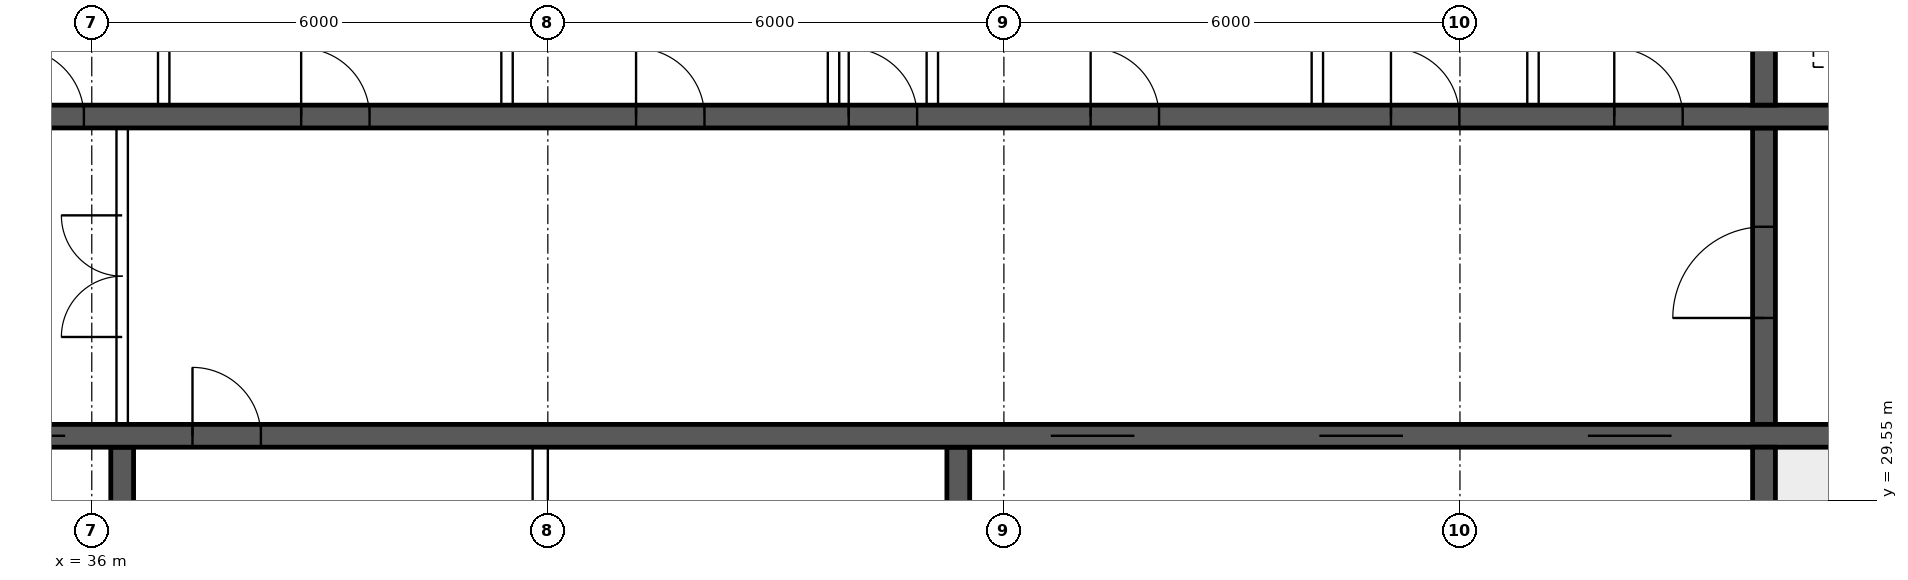
"""IFC4 building model, lengths in metres.
Left out: names, types, materials, properties, quantities, classifications, styles, units other than length and angle.
Written with IfcOpenShell. Run it as: python <this file> out.ifc"""

import sys

from ifc_helpers import new_model, si_unit, direction, frame, frame_2d, origin, place, context, subcontext, project, spatial, rectangle, extrude, element, fill, save


model = new_model("IFC4")
c1 = context("Model", 3, precision=1e-05, world=origin(), true_north=direction((0.0, 1.0)))
c2 = subcontext(c1, "Body", "Model", "MODEL_VIEW")
j1 = project(units=[si_unit("LENGTHUNIT", "METRE"), si_unit("PLANEANGLEUNIT", "RADIAN")], contexts=[c1])
p1 = place(None, origin())
s1 = spatial("IfcSite", under=j1, at=p1, CompositionType="ELEMENT")
p2 = place(p1, origin())
s2 = spatial("IfcBuilding", under=s1, at=p2, CompositionType="ELEMENT")
p3 = place(p2, frame((0.0, 0.0, 189.85)))
s3 = spatial("IfcBuildingStorey", under=s2, at=p3, CompositionType="ELEMENT", Elevation=189.85)
p4 = place(p3, frame((18.425, 30.4, 0.0), z_axis=(0.0, 0.0, 1.0), x_axis=(1.0, 0.0, 0.0)))
e1 = element("IfcWall", 1, at=p4, inside=s3, PredefinedType="SHEAR", context=c2, shape_type="SweptSolid", body=[
    extrude(rectangle(XDim=47.15, YDim=0.3, at=frame_2d((23.575, 0.0))), origin(), (0.0, 0.0, 1.0), 3.75),
])
p5 = place(p4, frame((0.4, 0.0, 0.0)))
e2 = element("IfcOpeningElement", 2, at=p5, cuts=e1, PredefinedType="OPENING", context=c2, shape_type="SweptSolid", body=[
    extrude(rectangle(XDim=1.0, YDim=2.1, at=frame_2d((0.5, 1.05))), frame((0.0, 0.16, 0.0), z_axis=(0.0, -1.0, 0.0), x_axis=(1.0, 0.0, 0.0)), (0.0, 0.0, 1.0), 0.32),
])
p6 = place(p4, frame((45.75, 0.0, 0.0)))
e3 = element("IfcOpeningElement", 3, at=p6, cuts=e1, PredefinedType="OPENING", context=c2, shape_type="SweptSolid", body=[
    extrude(rectangle(XDim=1.0, YDim=2.1, at=frame_2d((0.5, 1.05))), frame((0.0, 0.16, 0.0), z_axis=(0.0, -1.0, 0.0), x_axis=(1.0, 0.0, 0.0)), (0.0, 0.0, 1.0), 0.32),
])
p7 = place(p4, frame((8.325, 0.0, 0.0)))
e4 = element("IfcOpeningElement", 4, at=p7, cuts=e1, PredefinedType="OPENING", context=c2, shape_type="SweptSolid", body=[
    extrude(rectangle(XDim=1.1, YDim=2.1, at=frame_2d((0.55, 1.05))), frame((0.0, 0.16, 0.0), z_axis=(0.0, -1.0, 0.0), x_axis=(1.0, 0.0, 0.0)), (0.0, 0.0, 1.0), 0.32),
])
p8 = place(p4, frame((10.925, 0.0, 0.0)))
e5 = element("IfcOpeningElement", 5, at=p8, cuts=e1, PredefinedType="OPENING", context=c2, shape_type="SweptSolid", body=[
    extrude(rectangle(XDim=1.1, YDim=2.1, at=frame_2d((0.55, 1.05))), frame((0.0, 0.16, 0.0), z_axis=(0.0, -1.0, 0.0), x_axis=(1.0, 0.0, 0.0)), (0.0, 0.0, 1.0), 0.32),
])
p9 = place(p4, frame((13.525, 0.0, 0.0)))
e6 = element("IfcOpeningElement", 6, at=p9, cuts=e1, PredefinedType="OPENING", context=c2, shape_type="SweptSolid", body=[
    extrude(rectangle(XDim=1.1, YDim=2.1, at=frame_2d((0.55, 1.05))), frame((0.0, 0.16, 0.0), z_axis=(0.0, -1.0, 0.0), x_axis=(1.0, 0.0, 0.0)), (0.0, 0.0, 1.0), 0.32),
])
p10 = place(p4, frame((16.125, 0.0, 0.0)))
e7 = element("IfcOpeningElement", 7, at=p10, cuts=e1, PredefinedType="OPENING", context=c2, shape_type="SweptSolid", body=[
    extrude(rectangle(XDim=1.1, YDim=2.1, at=frame_2d((0.55, 1.05))), frame((0.0, 0.16, 0.0), z_axis=(0.0, -1.0, 0.0), x_axis=(1.0, 0.0, 0.0)), (0.0, 0.0, 1.0), 0.32),
])
p11 = place(p4, frame((18.9, 0.0, 0.0)))
e8 = element("IfcOpeningElement", 8, at=p11, cuts=e1, PredefinedType="OPENING", context=c2, shape_type="SweptSolid", body=[
    extrude(rectangle(XDim=0.9, YDim=2.1, at=frame_2d((0.45, 1.05))), frame((0.0, 0.16, 0.0), z_axis=(0.0, -1.0, 0.0), x_axis=(1.0, 0.0, 0.0)), (0.0, 0.0, 1.0), 0.32),
])
p12 = place(p4, frame((30.192, 0.0, 0.0)))
e9 = element("IfcOpeningElement", 9, at=p12, cuts=e1, PredefinedType="OPENING", context=c2, shape_type="SweptSolid", body=[
    extrude(rectangle(XDim=1.1, YDim=2.1, at=frame_2d((0.55, 1.05))), frame((0.0, 0.16, 0.0), z_axis=(0.0, -1.0, 0.0), x_axis=(1.0, 0.0, 0.0)), (0.0, 0.0, 1.0), 0.32),
])
p13 = place(p4, frame((33.725, 0.0, 0.0)))
e10 = element("IfcOpeningElement", 10, at=p13, cuts=e1, PredefinedType="OPENING", context=c2, shape_type="SweptSolid", body=[
    extrude(rectangle(XDim=1.1, YDim=2.1, at=frame_2d((0.55, 1.05))), frame((0.0, 0.16, 0.0), z_axis=(0.0, -1.0, 0.0), x_axis=(1.0, 0.0, 0.0)), (0.0, 0.0, 1.0), 0.32),
])
p14 = place(p4, frame((37.258, 0.0, 0.0)))
e11 = element("IfcOpeningElement", 11, at=p14, cuts=e1, PredefinedType="OPENING", context=c2, shape_type="SweptSolid", body=[
    extrude(rectangle(XDim=1.1, YDim=2.1, at=frame_2d((0.55, 1.05))), frame((0.0, 0.16, 0.0), z_axis=(0.0, -1.0, 0.0), x_axis=(1.0, 0.0, 0.0)), (0.0, 0.0, 1.0), 0.32),
])
p15 = place(p3, frame((18.425, 34.6, 0.0), z_axis=(0.0, 0.0, 1.0), x_axis=(1.0, 0.0, 0.0)))
e12 = element("IfcWall", 12, at=p15, inside=s3, PredefinedType="SHEAR", context=c2, shape_type="SweptSolid", body=[
    extrude(rectangle(XDim=47.15, YDim=0.3, at=frame_2d((23.575, 0.0))), origin(), (0.0, 0.0, 1.0), 3.75),
])
p16 = place(p15, frame((0.9, 0.0, 0.0)))
e13 = element("IfcOpeningElement", 13, at=p16, cuts=e12, PredefinedType="OPENING", context=c2, shape_type="SweptSolid", body=[
    extrude(rectangle(XDim=1.1, YDim=2.1, at=frame_2d((0.55, 1.05))), frame((0.0, 0.16, 0.0), z_axis=(0.0, -1.0, 0.0), x_axis=(1.0, 0.0, 0.0)), (0.0, 0.0, 1.0), 0.32),
])
p17 = place(p15, frame((45.15, 0.0, 0.0)))
e14 = element("IfcOpeningElement", 14, at=p17, cuts=e12, PredefinedType="OPENING", context=c2, shape_type="SweptSolid", body=[
    extrude(rectangle(XDim=1.1, YDim=2.1, at=frame_2d((0.55, 1.05))), frame((0.0, 0.16, 0.0), z_axis=(0.0, -1.0, 0.0), x_axis=(1.0, 0.0, 0.0)), (0.0, 0.0, 1.0), 0.32),
])
p18 = place(p15, frame((4.175, 0.0, 0.0)))
e15 = element("IfcOpeningElement", 15, at=p18, cuts=e12, PredefinedType="OPENING", context=c2, shape_type="SweptSolid", body=[
    extrude(rectangle(XDim=0.9, YDim=2.1, at=frame_2d((0.45, 1.05))), frame((0.0, 0.16, 0.0), z_axis=(0.0, -1.0, 0.0), x_axis=(1.0, 0.0, 0.0)), (0.0, 0.0, 1.0), 0.32),
])
p19 = place(p15, frame((42.075, 0.0, 0.0)))
e16 = element("IfcOpeningElement", 16, at=p19, cuts=e12, PredefinedType="OPENING", context=c2, shape_type="SweptSolid", body=[
    extrude(rectangle(XDim=0.9, YDim=2.1, at=frame_2d((0.45, 1.05))), frame((0.0, 0.16, 0.0), z_axis=(0.0, -1.0, 0.0), x_axis=(1.0, 0.0, 0.0)), (0.0, 0.0, 1.0), 0.32),
])
p20 = place(p15, frame((8.95, 0.0, 0.0)))
e17 = element("IfcOpeningElement", 17, at=p20, cuts=e12, PredefinedType="OPENING", context=c2, shape_type="SweptSolid", body=[
    extrude(rectangle(XDim=0.9, YDim=2.1, at=frame_2d((0.45, 1.05))), frame((0.0, 0.16, 0.0), z_axis=(0.0, -1.0, 0.0), x_axis=(1.0, 0.0, 0.0)), (0.0, 0.0, 1.0), 0.32),
])
p21 = place(p15, frame((12.924, 0.0, 0.0)))
e18 = element("IfcOpeningElement", 18, at=p21, cuts=e12, PredefinedType="OPENING", context=c2, shape_type="SweptSolid", body=[
    extrude(rectangle(XDim=0.9, YDim=2.1, at=frame_2d((0.45, 1.05))), frame((0.0, 0.16, 0.0), z_axis=(0.0, -1.0, 0.0), x_axis=(1.0, 0.0, 0.0)), (0.0, 0.0, 1.0), 0.32),
])
p22 = place(p15, frame((16.571, 0.0, 0.0)))
e19 = element("IfcOpeningElement", 19, at=p22, cuts=e12, PredefinedType="OPENING", context=c2, shape_type="SweptSolid", body=[
    extrude(rectangle(XDim=0.9, YDim=2.1, at=frame_2d((0.45, 1.05))), frame((0.0, 0.16, 0.0), z_axis=(0.0, -1.0, 0.0), x_axis=(1.0, 0.0, 0.0)), (0.0, 0.0, 1.0), 0.32),
])
p23 = place(p15, frame((20.33, 0.0, 0.0)))
e20 = element("IfcOpeningElement", 20, at=p23, cuts=e12, PredefinedType="OPENING", context=c2, shape_type="SweptSolid", body=[
    extrude(rectangle(XDim=0.9, YDim=2.1, at=frame_2d((0.45, 1.05))), frame((0.0, 0.16, 0.0), z_axis=(0.0, -1.0, 0.0), x_axis=(1.0, 0.0, 0.0)), (0.0, 0.0, 1.0), 0.32),
])
p24 = place(p15, frame((24.736, 0.0, 0.0)))
e21 = element("IfcOpeningElement", 21, at=p24, cuts=e12, PredefinedType="OPENING", context=c2, shape_type="SweptSolid", body=[
    extrude(rectangle(XDim=0.9, YDim=2.1, at=frame_2d((0.45, 1.05))), frame((0.0, 0.16, 0.0), z_axis=(0.0, -1.0, 0.0), x_axis=(1.0, 0.0, 0.0)), (0.0, 0.0, 1.0), 0.32),
])
p25 = place(p15, frame((27.533, 0.0, 0.0)))
e22 = element("IfcOpeningElement", 22, at=p25, cuts=e12, PredefinedType="OPENING", context=c2, shape_type="SweptSolid", body=[
    extrude(rectangle(XDim=0.9, YDim=2.1, at=frame_2d((0.45, 1.05))), frame((0.0, 0.16, 0.0), z_axis=(0.0, -1.0, 0.0), x_axis=(1.0, 0.0, 0.0)), (0.0, 0.0, 1.0), 0.32),
])
p26 = place(p15, frame((30.716, 0.0, 0.0)))
e23 = element("IfcOpeningElement", 23, at=p26, cuts=e12, PredefinedType="OPENING", context=c2, shape_type="SweptSolid", body=[
    extrude(rectangle(XDim=0.9, YDim=2.1, at=frame_2d((0.45, 1.05))), frame((0.0, 0.16, 0.0), z_axis=(0.0, -1.0, 0.0), x_axis=(1.0, 0.0, 0.0)), (0.0, 0.0, 1.0), 0.32),
])
p27 = place(p15, frame((34.667, 0.0, 0.0)))
e24 = element("IfcOpeningElement", 24, at=p27, cuts=e12, PredefinedType="OPENING", context=c2, shape_type="SweptSolid", body=[
    extrude(rectangle(XDim=0.9, YDim=2.1, at=frame_2d((0.45, 1.05))), frame((0.0, 0.16, 0.0), z_axis=(0.0, -1.0, 0.0), x_axis=(1.0, 0.0, 0.0)), (0.0, 0.0, 1.0), 0.32),
])
p28 = place(p15, frame((37.605, 0.0, 0.0)))
e25 = element("IfcOpeningElement", 25, at=p28, cuts=e12, PredefinedType="OPENING", context=c2, shape_type="SweptSolid", body=[
    extrude(rectangle(XDim=0.9, YDim=2.1, at=frame_2d((0.45, 1.05))), frame((0.0, 0.16, 0.0), z_axis=(0.0, -1.0, 0.0), x_axis=(1.0, 0.0, 0.0)), (0.0, 0.0, 1.0), 0.32),
])
p29 = place(p3, frame((58.0, 26.225, 0.0), z_axis=(0.0, 0.0, 1.0), x_axis=(0.0, 1.0, 0.0)))
e26 = element("IfcWall", 26, at=p29, inside=s3, PredefinedType="SHEAR", context=c2, shape_type="SweptSolid", body=[
    extrude(rectangle(XDim=4.025, YDim=0.3, at=frame_2d((2.012, 0.0))), origin(), (0.0, 0.0, 1.0), 3.75),
])
p30 = place(p3, frame((58.0, 30.55, 0.0), z_axis=(0.0, 0.0, 1.0), x_axis=(0.0, 1.0, 0.0)))
e27 = element("IfcWall", 27, at=p30, inside=s3, PredefinedType="SHEAR", context=c2, shape_type="SweptSolid", body=[
    extrude(rectangle(XDim=3.9, YDim=0.3, at=frame_2d((1.95, 0.0))), origin(), (0.0, 0.0, 1.0), 3.75),
])
p31 = place(p30, frame((1.4, 0.0, 0.0)))
e28 = element("IfcOpeningElement", 28, at=p31, cuts=e27, PredefinedType="OPENING", context=c2, shape_type="SweptSolid", body=[
    extrude(rectangle(XDim=1.2, YDim=2.1, at=frame_2d((0.6, 1.05))), frame((0.0, 0.16, 0.0), z_axis=(0.0, -1.0, 0.0), x_axis=(1.0, 0.0, 0.0)), (0.0, 0.0, 1.0), 0.32),
])
p32 = place(p3, frame((58.0, 34.75, 0.0), z_axis=(0.0, 0.0, 1.0), x_axis=(0.0, 1.0, 0.0)))
e29 = element("IfcWall", 29, at=p32, inside=s3, PredefinedType="SHEAR", context=c2, shape_type="SweptSolid", body=[
    extrude(rectangle(XDim=3.025, YDim=0.3, at=frame_2d((1.512, 0.0))), origin(), (0.0, 0.0, 1.0), 3.75),
])
for number, where, z_axis, x_axis in (
    (30, (36.4, 26.225, 0.0), (0.0, 0.0, 1.0), (0.0, 1.0, 0.0)),
    (31, (47.4, 26.225, 0.0), (0.0, 0.0, 1.0), (0.0, 1.0, 0.0)),
):
    element("IfcWall", number, at=place(p3, frame(where, z_axis=z_axis, x_axis=x_axis)), inside=s3, PredefinedType="SHEAR", context=c2, shape_type="SweptSolid", body=[
        extrude(rectangle(XDim=4.025, YDim=0.3, at=frame_2d((2.012, 0.0))), origin(), (0.0, 0.0, 1.0), 3.75),
    ])
p33 = place(p3, frame((36.4, 30.55, 0.0), z_axis=(0.0, 0.0, 1.0), x_axis=(0.0, 1.0, 0.0)))
e32 = element("IfcWall", 32, at=p33, inside=s3, PredefinedType="SOLIDWALL", context=c2, shape_type="SweptSolid", body=[
    extrude(rectangle(XDim=3.9, YDim=0.15, at=frame_2d((1.95, 0.0))), origin(), (0.0, 0.0, 1.0), 3.3),
])
p34 = place(p33, frame((1.15, 0.0, 0.0)))
e33 = element("IfcOpeningElement", 33, at=p34, cuts=e32, PredefinedType="OPENING", context=c2, shape_type="SweptSolid", body=[
    extrude(rectangle(XDim=1.6, YDim=2.1, at=frame_2d((0.8, 1.05))), frame((0.0, 0.085, 0.0), z_axis=(0.0, -1.0, 0.0), x_axis=(1.0, 0.0, 0.0)), (0.0, 0.0, 1.0), 0.17),
])
for number, where, z_axis, x_axis in (
    (34, (36.946, 34.75, 0.0), (0.0, 0.0, 1.0), (0.0, 1.0, 0.0)),
    (35, (41.463, 34.75, 0.0), (0.0, 0.0, 1.0), (0.0, 1.0, 0.0)),
    (36, (45.758, 34.75, 0.0), (0.0, 0.0, 1.0), (0.0, 1.0, 0.0)),
    (37, (47.058, 34.75, 0.0), (0.0, 0.0, 1.0), (0.0, 1.0, 0.0)),
    (38, (52.124, 34.75, 0.0), (0.0, 0.0, 1.0), (0.0, 1.0, 0.0)),
    (39, (54.961, 34.75, 0.0), (0.0, 0.0, 1.0), (0.0, 1.0, 0.0)),
):
    element("IfcWall", number, at=place(p3, frame(where, z_axis=z_axis, x_axis=x_axis)), inside=s3, PredefinedType="SOLIDWALL", context=c2, shape_type="SweptSolid", body=[
        extrude(rectangle(XDim=3.025, YDim=0.15, at=frame_2d((1.512, 0.0))), origin(), (0.0, 0.0, 1.0), 3.3),
    ])
p35 = place(p3, frame((41.9, 26.225, 0.0), z_axis=(0.0, 0.0, 1.0), x_axis=(0.0, 1.0, 0.0)))
e40 = element("IfcWall", 40, at=p35, inside=s3, PredefinedType="SOLIDWALL", context=c2, shape_type="SweptSolid", body=[
    extrude(rectangle(XDim=4.025, YDim=0.2, at=frame_2d((2.012, 0.0))), origin(), (0.0, 0.0, 1.0), 3.3),
])
p36 = place(p34, origin())
e41 = element("IfcDoor", 41, at=p36, inside=s3, OperationType="DOUBLE_DOOR_SINGLE_SWING", PredefinedType="DOOR", context=c2, shape_type="SweptSolid", body=[
    extrude(rectangle(XDim=1.6, YDim=2.1, at=frame_2d((0.8, 1.05))), frame((0.0, 0.025, 0.0), z_axis=(0.0, -1.0, 0.0), x_axis=(1.0, 0.0, 0.0)), (0.0, 0.0, 1.0), 0.05),
])
fill(e33, e41)
p37 = place(p31, origin())
e42 = element("IfcDoor", 42, at=p37, inside=s3, OperationType="SINGLE_SWING_LEFT", PredefinedType="DOOR", context=c2, shape_type="SweptSolid", body=[
    extrude(rectangle(XDim=1.2, YDim=2.1, at=frame_2d((0.6, 1.05))), frame((0.0, 0.025, 0.0), z_axis=(0.0, -1.0, 0.0), x_axis=(1.0, 0.0, 0.0)), (0.0, 0.0, 1.0), 0.05),
])
fill(e28, e42)
p38 = place(p22, origin())
e43 = element("IfcDoor", 43, at=p38, inside=s3, OperationType="SINGLE_SWING_LEFT", PredefinedType="DOOR", context=c2, shape_type="SweptSolid", body=[
    extrude(rectangle(XDim=0.9, YDim=2.1, at=frame_2d((0.45, 1.05))), frame((0.0, 0.025, 0.0), z_axis=(0.0, -1.0, 0.0), x_axis=(1.0, 0.0, 0.0)), (0.0, 0.0, 1.0), 0.05),
])
fill(e19, e43)
p39 = place(p23, origin())
e44 = element("IfcDoor", 44, at=p39, inside=s3, OperationType="SINGLE_SWING_LEFT", PredefinedType="DOOR", context=c2, shape_type="SweptSolid", body=[
    extrude(rectangle(XDim=0.9, YDim=2.1, at=frame_2d((0.45, 1.05))), frame((0.0, 0.025, 0.0), z_axis=(0.0, -1.0, 0.0), x_axis=(1.0, 0.0, 0.0)), (0.0, 0.0, 1.0), 0.05),
])
fill(e20, e44)
p40 = place(p24, origin())
e45 = element("IfcDoor", 45, at=p40, inside=s3, OperationType="SINGLE_SWING_LEFT", PredefinedType="DOOR", context=c2, shape_type="SweptSolid", body=[
    extrude(rectangle(XDim=0.9, YDim=2.1, at=frame_2d((0.45, 1.05))), frame((0.0, 0.025, 0.0), z_axis=(0.0, -1.0, 0.0), x_axis=(1.0, 0.0, 0.0)), (0.0, 0.0, 1.0), 0.05),
])
fill(e21, e45)
p41 = place(p25, origin())
e46 = element("IfcDoor", 46, at=p41, inside=s3, OperationType="SINGLE_SWING_LEFT", PredefinedType="DOOR", context=c2, shape_type="SweptSolid", body=[
    extrude(rectangle(XDim=0.9, YDim=2.1, at=frame_2d((0.45, 1.05))), frame((0.0, 0.025, 0.0), z_axis=(0.0, -1.0, 0.0), x_axis=(1.0, 0.0, 0.0)), (0.0, 0.0, 1.0), 0.05),
])
fill(e22, e46)
p42 = place(p26, origin())
e47 = element("IfcDoor", 47, at=p42, inside=s3, OperationType="SINGLE_SWING_LEFT", PredefinedType="DOOR", context=c2, shape_type="SweptSolid", body=[
    extrude(rectangle(XDim=0.9, YDim=2.1, at=frame_2d((0.45, 1.05))), frame((0.0, 0.025, 0.0), z_axis=(0.0, -1.0, 0.0), x_axis=(1.0, 0.0, 0.0)), (0.0, 0.0, 1.0), 0.05),
])
fill(e23, e47)
p43 = place(p27, origin())
e48 = element("IfcDoor", 48, at=p43, inside=s3, OperationType="SINGLE_SWING_LEFT", PredefinedType="DOOR", context=c2, shape_type="SweptSolid", body=[
    extrude(rectangle(XDim=0.9, YDim=2.1, at=frame_2d((0.45, 1.05))), frame((0.0, 0.025, 0.0), z_axis=(0.0, -1.0, 0.0), x_axis=(1.0, 0.0, 0.0)), (0.0, 0.0, 1.0), 0.05),
])
fill(e24, e48)
p44 = place(p28, origin())
e49 = element("IfcDoor", 49, at=p44, inside=s3, OperationType="SINGLE_SWING_LEFT", PredefinedType="DOOR", context=c2, shape_type="SweptSolid", body=[
    extrude(rectangle(XDim=0.9, YDim=2.1, at=frame_2d((0.45, 1.05))), frame((0.0, 0.025, 0.0), z_axis=(0.0, -1.0, 0.0), x_axis=(1.0, 0.0, 0.0)), (0.0, 0.0, 1.0), 0.05),
])
fill(e25, e49)
p45 = place(p10, origin())
e50 = element("IfcDoor", 50, at=p45, inside=s3, OperationType="DOUBLE_DOOR_SLIDING", PredefinedType="DOOR", context=c2, shape_type="SweptSolid", body=[
    extrude(rectangle(XDim=1.1, YDim=2.1, at=frame_2d((0.55, 1.05))), frame((0.0, 0.025, 0.0), z_axis=(0.0, -1.0, 0.0), x_axis=(1.0, 0.0, 0.0)), (0.0, 0.0, 1.0), 0.05),
])
fill(e7, e50)
p46 = place(p11, origin())
e51 = element("IfcDoor", 51, at=p46, inside=s3, OperationType="SINGLE_SWING_LEFT", PredefinedType="DOOR", context=c2, shape_type="SweptSolid", body=[
    extrude(rectangle(XDim=0.9, YDim=2.1, at=frame_2d((0.45, 1.05))), frame((0.0, 0.025, 0.0), z_axis=(0.0, -1.0, 0.0), x_axis=(1.0, 0.0, 0.0)), (0.0, 0.0, 1.0), 0.05),
])
fill(e8, e51)
p47 = place(p12, origin())
e52 = element("IfcDoor", 52, at=p47, inside=s3, OperationType="DOUBLE_DOOR_SLIDING", PredefinedType="DOOR", context=c2, shape_type="SweptSolid", body=[
    extrude(rectangle(XDim=1.1, YDim=2.1, at=frame_2d((0.55, 1.05))), frame((0.0, 0.025, 0.0), z_axis=(0.0, -1.0, 0.0), x_axis=(1.0, 0.0, 0.0)), (0.0, 0.0, 1.0), 0.05),
])
fill(e9, e52)
p48 = place(p13, origin())
e53 = element("IfcDoor", 53, at=p48, inside=s3, OperationType="DOUBLE_DOOR_SLIDING", PredefinedType="DOOR", context=c2, shape_type="SweptSolid", body=[
    extrude(rectangle(XDim=1.1, YDim=2.1, at=frame_2d((0.55, 1.05))), frame((0.0, 0.025, 0.0), z_axis=(0.0, -1.0, 0.0), x_axis=(1.0, 0.0, 0.0)), (0.0, 0.0, 1.0), 0.05),
])
fill(e10, e53)
p49 = place(p14, origin())
e54 = element("IfcDoor", 54, at=p49, inside=s3, OperationType="DOUBLE_DOOR_SLIDING", PredefinedType="DOOR", context=c2, shape_type="SweptSolid", body=[
    extrude(rectangle(XDim=1.1, YDim=2.1, at=frame_2d((0.55, 1.05))), frame((0.0, 0.025, 0.0), z_axis=(0.0, -1.0, 0.0), x_axis=(1.0, 0.0, 0.0)), (0.0, 0.0, 1.0), 0.05),
])
fill(e11, e54)
save(model, sys.argv[1])
